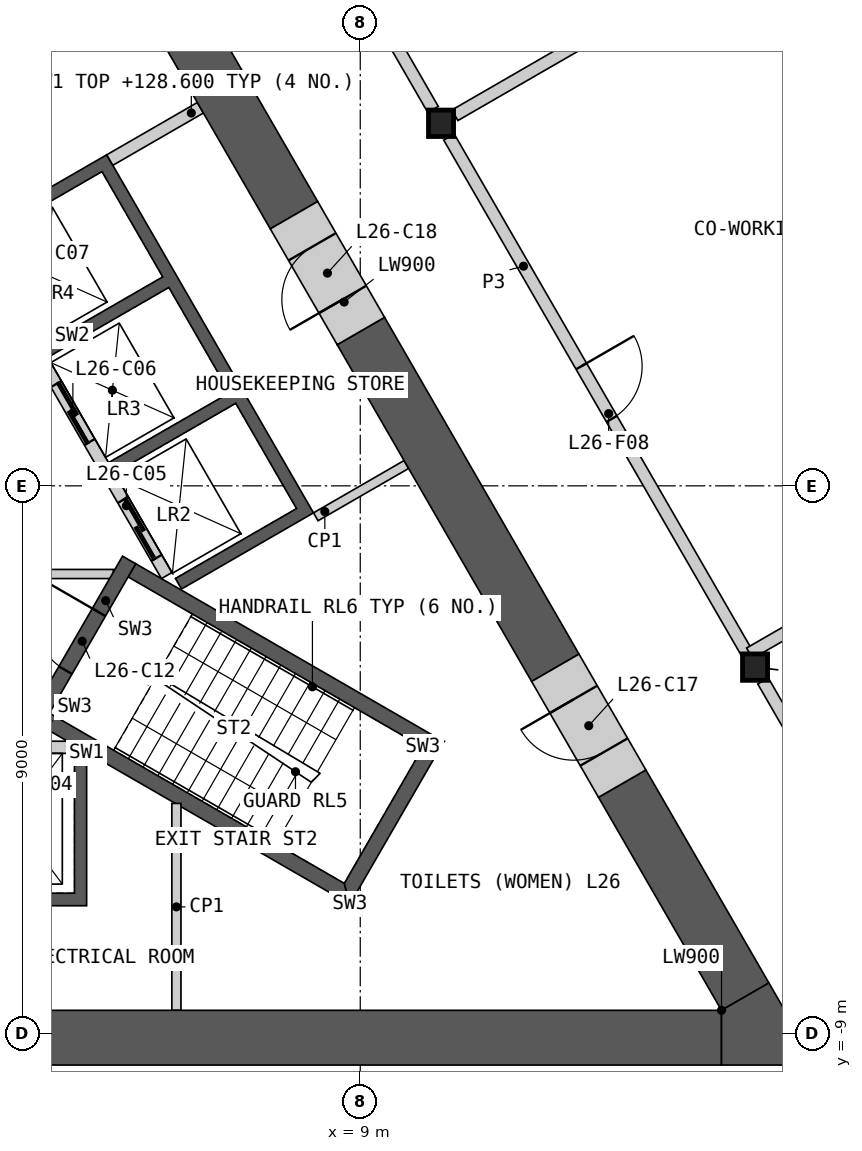
"""IFC4 building model, lengths in metres.
Left out: names, types, materials, properties, quantities, classifications, styles, units other than length and angle.
Written with IfcOpenShell. Run it as: python <this file> out.ifc"""

import sys

from ifc_helpers import new_model, si_unit, direction, frame, frame_2d, origin, origin_2d, place, context, subcontext, project, spatial, polyline, rectangle, i_section, outline, extrude, element, fill, save


model = new_model("IFC4")
c1 = context("Model", 3, precision=1e-05, world=origin(), true_north=direction((0.0, 1.0)))
c2 = subcontext(c1, "Body", "Model", "MODEL_VIEW")
j1 = project(units=[si_unit("LENGTHUNIT", "METRE"), si_unit("PLANEANGLEUNIT", "RADIAN")], contexts=[c1])
p1 = place(None, origin())
s1 = spatial("IfcSite", under=j1, at=p1, CompositionType="ELEMENT")
p2 = place(p1, origin())
s2 = spatial("IfcBuilding", under=s1, at=p2, CompositionType="ELEMENT")
p3 = place(p2, frame((0.0, 0.0, 124.8)))
s3 = spatial("IfcBuildingStorey", under=s2, at=p3, CompositionType="ELEMENT", Elevation=124.8)
for number, where, z_axis, x_axis in (
    (1, (15.493, -2.982, 0.0), (0.0, 0.0, 1.0), (1.0, 0.0, 0.0)),
    (2, (10.328, 5.963, 0.0), (0.0, 0.0, 1.0), (1.0, 0.0, 0.0)),
):
    element("IfcColumn", number, at=place(p3, frame(where, z_axis=z_axis, x_axis=x_axis)), inside=s3, PredefinedType="COLUMN", context=c2, shape_type="SweptSolid", body=[
        extrude(i_section(OverallWidth=0.412, OverallDepth=0.435, WebThickness=0.036, FlangeThickness=0.057, at=origin_2d()), origin(), (0.0, 0.0, 1.0), 4.2),
    ])
p4 = place(p3, origin())
e3 = element("IfcWall", 3, at=p4, inside=s3, PredefinedType="SHEAR", context=c2, shape_type="SweptSolid", body=[
    extrude(outline(polyline([(4.5, -4.4), (4.5, -6.906), (-4.5, -6.906), (-4.5, -4.4), (-4.3, -4.4), (-4.3, -6.7), (-2.3, -6.7), (-2.3, -4.4), (-2.1, -4.4), (-2.1, -6.7), (-0.1, -6.7), (-0.1, -4.4), (0.1, -4.4), (0.1, -6.7), (2.1, -6.7), (2.1, -4.4), (2.3, -4.4), (2.3, -6.7), (4.3, -6.7), (4.3, -4.4), (4.5, -4.4)])), origin(), (0.0, 0.0, 1.0), 3.8),
])
p5 = place(p3, frame((-4.187, -4.3, 0.0), z_axis=(0.0, 0.0, 1.0), x_axis=(1.0, 0.0, 0.0)))
e4 = element("IfcWall", 4, at=p5, inside=s3, PredefinedType="SOLIDWALL", context=c2, shape_type="SweptSolid", body=[
    extrude(rectangle(XDim=8.373, YDim=0.2, at=frame_2d((4.187, 0.0))), origin(), (0.0, 0.0, 1.0), 3.8),
])
p6 = place(p5, frame((0.287, 0.0, 0.0)))
e5 = element("IfcOpeningElement", 5, at=p6, cuts=e4, PredefinedType="OPENING", context=c2, shape_type="SweptSolid", body=[
    extrude(rectangle(XDim=1.2, YDim=2.1, at=frame_2d((0.6, 1.05))), frame((0.0, 0.11, 0.0), z_axis=(0.0, -1.0, 0.0), x_axis=(1.0, 0.0, 0.0)), (0.0, 0.0, 1.0), 0.22),
])
p7 = place(p5, frame((2.387, 0.0, 0.0)))
e6 = element("IfcOpeningElement", 6, at=p7, cuts=e4, PredefinedType="OPENING", context=c2, shape_type="SweptSolid", body=[
    extrude(rectangle(XDim=1.4, YDim=2.1, at=frame_2d((0.7, 1.05))), frame((0.0, 0.11, 0.0), z_axis=(0.0, -1.0, 0.0), x_axis=(1.0, 0.0, 0.0)), (0.0, 0.0, 1.0), 0.22),
])
p8 = place(p5, frame((4.737, 0.0, 0.0)))
e7 = element("IfcOpeningElement", 7, at=p8, cuts=e4, PredefinedType="OPENING", context=c2, shape_type="SweptSolid", body=[
    extrude(rectangle(XDim=1.1, YDim=2.1, at=frame_2d((0.55, 1.05))), frame((0.0, 0.11, 0.0), z_axis=(0.0, -1.0, 0.0), x_axis=(1.0, 0.0, 0.0)), (0.0, 0.0, 1.0), 0.22),
])
p9 = place(p5, frame((6.887, 0.0, 0.0)))
e8 = element("IfcOpeningElement", 8, at=p9, cuts=e4, PredefinedType="OPENING", context=c2, shape_type="SweptSolid", body=[
    extrude(rectangle(XDim=1.2, YDim=2.1, at=frame_2d((0.6, 1.05))), frame((0.0, 0.11, 0.0), z_axis=(0.0, -1.0, 0.0), x_axis=(1.0, 0.0, 0.0)), (0.0, 0.0, 1.0), 0.22),
])
p10 = place(p3, origin())
e9 = element("IfcWall", 9, at=p10, inside=s3, PredefinedType="SHEAR", context=c2, shape_type="SweptSolid", body=[
    extrude(outline(polyline([(2.66, 4.192), (4.831, 5.445), (8.231, -0.444), (6.061, -1.697), (5.96, -1.524), (7.952, -0.374), (6.952, 1.358), (4.96, 0.208), (4.861, 0.381), (6.852, 1.531), (5.852, 3.263), (3.861, 2.113), (3.76, 2.287), (5.752, 3.437), (4.752, 5.169), (2.76, 4.019), (2.66, 4.192)])), origin(), (0.0, 0.0, 1.0), 3.8),
])
p11 = place(p3, frame((5.817, -1.476, 0.0), z_axis=(0.0, 0.0, 1.0), x_axis=(-0.500002616675, 0.866023893041, 0.0)))
e10 = element("IfcWall", 10, at=p11, inside=s3, PredefinedType="SOLIDWALL", context=c2, shape_type="SweptSolid", body=[
    extrude(rectangle(XDim=8.373, YDim=0.2, at=frame_2d((4.187, 0.0))), origin(), (0.0, 0.0, 1.0), 3.8),
])
p12 = place(p11, frame((0.337, 0.0, 0.0)))
e11 = element("IfcOpeningElement", 11, at=p12, cuts=e10, PredefinedType="OPENING", context=c2, shape_type="SweptSolid", body=[
    extrude(rectangle(XDim=1.1, YDim=2.1, at=frame_2d((0.55, 1.05))), frame((0.0, 0.11, 0.0), z_axis=(0.0, -1.0, 0.0), x_axis=(1.0, 0.0, 0.0)), (0.0, 0.0, 1.0), 0.22),
])
p13 = place(p11, frame((2.537, 0.0, 0.0)))
e12 = element("IfcOpeningElement", 12, at=p13, cuts=e10, PredefinedType="OPENING", context=c2, shape_type="SweptSolid", body=[
    extrude(rectangle(XDim=1.1, YDim=2.1, at=frame_2d((0.55, 1.05))), frame((0.0, 0.11, 0.0), z_axis=(0.0, -1.0, 0.0), x_axis=(1.0, 0.0, 0.0)), (0.0, 0.0, 1.0), 0.22),
])
p14 = place(p11, frame((4.737, 0.0, 0.0)))
e13 = element("IfcOpeningElement", 13, at=p14, cuts=e10, PredefinedType="OPENING", context=c2, shape_type="SweptSolid", body=[
    extrude(rectangle(XDim=1.1, YDim=2.1, at=frame_2d((0.55, 1.05))), frame((0.0, 0.11, 0.0), z_axis=(0.0, -1.0, 0.0), x_axis=(1.0, 0.0, 0.0)), (0.0, 0.0, 1.0), 0.22),
])
p15 = place(p11, frame((7.037, 0.0, 0.0)))
e14 = element("IfcOpeningElement", 14, at=p15, cuts=e10, PredefinedType="OPENING", context=c2, shape_type="SweptSolid", body=[
    extrude(rectangle(XDim=0.9, YDim=2.1, at=frame_2d((0.45, 1.05))), frame((0.0, 0.11, 0.0), z_axis=(0.0, -1.0, 0.0), x_axis=(1.0, 0.0, 0.0)), (0.0, 0.0, 1.0), 0.22),
])
p16 = place(p3, frame((4.881, 5.358, 0.0), z_axis=(0.0, 0.0, 1.0), x_axis=(0.866024871741, 0.500000921525, 0.0)))
e15 = element("IfcWall", 15, at=p16, inside=s3, PredefinedType="SHEAR", context=c2, shape_type="SweptSolid", body=[
    extrude(rectangle(XDim=1.72, YDim=0.2, at=frame_2d((0.86, 0.0))), origin(), (0.0, 0.0, 1.0), 3.8),
])
p17 = place(p3, frame((-4.941, -1.45, 0.0), z_axis=(0.0, 0.0, 1.0), x_axis=(1.0, 0.0, 0.0)))
e16 = element("IfcWall", 16, at=p17, inside=s3, PredefinedType="PARTITIONING", context=c2, shape_type="SweptSolid", body=[
    extrude(rectangle(XDim=9.882, YDim=0.15, at=frame_2d((4.941, 0.0))), origin(), (0.0, 0.0, 1.0), 3.8),
])
p18 = place(p17, frame((4.391, 0.0, 0.0)))
e17 = element("IfcOpeningElement", 17, at=p18, cuts=e16, PredefinedType="OPENING", context=c2, shape_type="SweptSolid", body=[
    extrude(rectangle(XDim=1.1, YDim=2.1, at=frame_2d((0.55, 1.05))), frame((0.0, 0.085, 0.0), z_axis=(0.0, -1.0, 0.0), x_axis=(1.0, 0.0, 0.0)), (0.0, 0.0, 1.0), 0.17),
])
p19 = place(p3, origin())
e18 = element("IfcWall", 18, at=p19, inside=s3, PredefinedType="SHEAR", context=c2, shape_type="SweptSolid", body=[
    extrude(outline(polyline([(3.763, -3.956), (8.83, -6.881), (8.738, -6.539), (3.888, -3.739), (3.763, -3.956)])), origin(), (0.0, 0.0, 1.0), 3.8),
])
p20 = place(p3, origin())
e19 = element("IfcWall", 19, at=p20, inside=s3, PredefinedType="SHEAR", context=c2, shape_type="SweptSolid", body=[
    extrude(outline(polyline([(8.83, -6.881), (10.374, -4.206), (10.032, -4.298), (8.738, -6.539), (8.83, -6.881)])), origin(), (0.0, 0.0, 1.0), 3.8),
])
p21 = place(p3, origin())
e20 = element("IfcWall", 20, at=p21, inside=s3, PredefinedType="SHEAR", context=c2, shape_type="SweptSolid", body=[
    extrude(outline(polyline([(10.032, -4.298), (10.374, -4.206), (5.307, -1.281), (5.182, -1.498), (10.032, -4.298)])), origin(), (0.0, 0.0, 1.0), 3.8),
])
p22 = place(p3, frame((3.655, -3.893, 0.0), z_axis=(0.0, 0.0, 1.0), x_axis=(0.499982516597, 0.866035497597, 0.0)))
e21 = element("IfcWall", 21, at=p22, inside=s3, PredefinedType="SHEAR", context=c2, shape_type="SweptSolid", body=[
    extrude(rectangle(XDim=3.088, YDim=0.25, at=frame_2d((1.544, 0.0))), origin(), (0.0, 0.0, 1.0), 3.8),
])
p23 = place(p22, frame((0.994, 0.0, 0.0)))
e22 = element("IfcOpeningElement", 22, at=p23, cuts=e21, PredefinedType="OPENING", context=c2, shape_type="SweptSolid", body=[
    extrude(rectangle(XDim=1.1, YDim=2.1, at=frame_2d((0.55, 1.05))), frame((0.0, 0.135, 0.0), z_axis=(0.0, -1.0, 0.0), x_axis=(1.0, 0.0, 0.0)), (0.0, 0.0, 1.0), 0.27),
])
p24 = place(p3, frame((8.268, -0.509, 0.0), z_axis=(0.0, 0.0, 1.0), x_axis=(0.866024871741, 0.500000921525, 0.0)))
e23 = element("IfcWall", 23, at=p24, inside=s3, PredefinedType="PARTITIONING", context=c2, shape_type="SweptSolid", body=[
    extrude(rectangle(XDim=1.72, YDim=0.15, at=frame_2d((0.86, 0.0))), origin(), (0.0, 0.0, 1.0), 3.8),
])
p25 = place(p3, frame((5.977, -8.626, 0.0), z_axis=(0.0, 0.0, 1.0), x_axis=(0.0, 1.0, 0.0)))
e24 = element("IfcWall", 24, at=p25, inside=s3, PredefinedType="PARTITIONING", context=c2, shape_type="SweptSolid", body=[
    extrude(rectangle(XDim=3.403, YDim=0.15, at=frame_2d((1.701, 0.0))), origin(), (0.0, 0.0, 1.0), 3.8),
])
p26 = place(p3, frame((3.913, -9.076, 0.0), z_axis=(0.0, 0.0, 1.0), x_axis=(1.0, 0.0, 0.0)))
e25 = element("IfcWall", 25, at=p26, inside=s3, PredefinedType="SHEAR", context=c2, shape_type="SweptSolid", body=[
    extrude(rectangle(XDim=11.029, YDim=0.9, at=frame_2d((5.514, 0.0))), origin(), (0.0, 0.0, 1.0), 3.8),
])
p27 = place(p3, frame((7.91, 4.451, 0.0), z_axis=(0.0, 0.0, 1.0), x_axis=(-0.500001962043, 0.866024270995, 0.0)))
e26 = element("IfcWall", 26, at=p27, inside=s3, PredefinedType="SHEAR", context=c2, shape_type="SweptSolid", body=[
    extrude(rectangle(XDim=8.796, YDim=0.9, at=frame_2d((4.398, 0.0))), origin(), (0.0, 0.0, 1.0), 3.8),
])
p28 = place(p3, frame((12.208, -2.992, 0.0), z_axis=(0.0, 0.0, 1.0), x_axis=(-0.499990106751, 0.866031115579, 0.0)))
e27 = element("IfcWall", 27, at=p28, inside=s3, PredefinedType="SHEAR", context=c2, shape_type="SweptSolid", body=[
    extrude(rectangle(XDim=6.396, YDim=0.9, at=frame_2d((3.198, 0.0))), origin(), (0.0, 0.0, 1.0), 3.8),
])
p29 = place(p3, frame((15.331, -8.401, 0.0), z_axis=(0.0, 0.0, 1.0), x_axis=(-0.499974938593, 0.866039872511, 0.0)))
e28 = element("IfcWall", 28, at=p29, inside=s3, PredefinedType="SHEAR", context=c2, shape_type="SweptSolid", body=[
    extrude(rectangle(XDim=4.046, YDim=0.9, at=frame_2d((2.023, 0.0))), origin(), (0.0, 0.0, 1.0), 3.8),
])
p30 = place(p3, origin())
e29 = element("IfcWall", 29, at=p30, inside=s3, PredefinedType="SHEAR", context=c2, shape_type="SweptSolid", body=[
    extrude(outline(polyline([(14.941, -8.626), (15.721, -8.176), (16.5, -9.526), (14.941, -9.526), (14.941, -8.626)])), origin(), (0.0, 0.0, 1.0), 3.8),
])
p31 = place(p3, frame((13.308, -4.898, 0.0), z_axis=(0.0, 0.0, 1.0), x_axis=(-0.50002983664, 0.866008176907, 0.0)))
e30 = element("IfcWall", 30, at=p31, inside=s3, PredefinedType="SHEAR", context=c2, shape_type="SweptSolid", body=[
    extrude(rectangle(XDim=2.2, YDim=0.9, at=frame_2d((1.1, 0.0))), origin(), (0.0, 0.0, 1.0), 3.8),
])
p32 = place(p31, frame((0.6, 0.0, 0.0)))
e31 = element("IfcOpeningElement", 31, at=p32, cuts=e30, PredefinedType="OPENING", context=c2, shape_type="SweptSolid", body=[
    extrude(rectangle(XDim=1.0, YDim=2.1, at=frame_2d((0.5, 1.05))), frame((0.0, 0.46, 0.0), z_axis=(0.0, -1.0, 0.0), x_axis=(1.0, 0.0, 0.0)), (0.0, 0.0, 1.0), 0.92),
])
p33 = place(p3, frame((9.01, 2.546, 0.0), z_axis=(0.0, 0.0, 1.0), x_axis=(-0.499994660107, 0.866028486751, 0.0)))
e32 = element("IfcWall", 32, at=p33, inside=s3, PredefinedType="SHEAR", context=c2, shape_type="SweptSolid", body=[
    extrude(rectangle(XDim=2.2, YDim=0.9, at=frame_2d((1.1, 0.0))), origin(), (0.0, 0.0, 1.0), 3.8),
])
p34 = place(p33, frame((0.6, 0.0, 0.0)))
e33 = element("IfcOpeningElement", 33, at=p34, cuts=e32, PredefinedType="OPENING", context=c2, shape_type="SweptSolid", body=[
    extrude(rectangle(XDim=1.0, YDim=2.1, at=frame_2d((0.5, 1.05))), frame((0.0, 0.46, 0.0), z_axis=(0.0, -1.0, 0.0), x_axis=(1.0, 0.0, 0.0)), (0.0, 0.0, 1.0), 0.92),
])
p35 = place(p3, frame((10.46, 5.736, 0.0), z_axis=(0.0, 0.0, 1.0), x_axis=(0.500004141693, -0.866023012564, 0.0)))
e34 = element("IfcWall", 34, at=p35, inside=s3, PredefinedType="PARTITIONING", context=c2, shape_type="SweptSolid", body=[
    extrude(rectangle(XDim=9.803, YDim=0.2, at=frame_2d((4.902, 0.0))), origin(), (0.0, 0.0, 1.0), 3.8),
])
p36 = place(p35, frame((4.352, 0.0, 0.0)))
e35 = element("IfcOpeningElement", 35, at=p36, cuts=e34, PredefinedType="OPENING", context=c2, shape_type="SweptSolid", body=[
    extrude(rectangle(XDim=1.0, YDim=2.1, at=frame_2d((0.5, 1.05))), frame((0.0, 0.11, 0.0), z_axis=(0.0, -1.0, 0.0), x_axis=(1.0, 0.0, 0.0)), (0.0, 0.0, 1.0), 0.22),
])
p37 = place(p3, frame((5.295, 14.68, 0.0), z_axis=(0.0, 0.0, 1.0), x_axis=(0.500012035596, -0.866018454918, 0.0)))
e36 = element("IfcWall", 36, at=p37, inside=s3, PredefinedType="PARTITIONING", context=c2, shape_type="SweptSolid", body=[
    extrude(rectangle(XDim=9.803, YDim=0.2, at=frame_2d((4.902, 0.0))), origin(), (0.0, 0.0, 1.0), 3.8),
])
p38 = place(p37, frame((4.052, 0.0, 0.0)))
e37 = element("IfcOpeningElement", 37, at=p38, cuts=e36, PredefinedType="OPENING", context=c2, shape_type="SweptSolid", body=[
    extrude(rectangle(XDim=1.8, YDim=2.1, at=frame_2d((0.9, 1.05))), frame((0.0, 0.11, 0.0), z_axis=(0.0, -1.0, 0.0), x_axis=(1.0, 0.0, 0.0)), (0.0, 0.0, 1.0), 0.22),
])
p39 = place(p3, frame((15.624, -3.209, 0.0), z_axis=(0.0, 0.0, 1.0), x_axis=(0.499997920671, -0.866026604282, 0.0)))
e38 = element("IfcWall", 38, at=p39, inside=s3, PredefinedType="PARTITIONING", context=c2, shape_type="SweptSolid", body=[
    extrude(rectangle(XDim=6.24, YDim=0.2, at=frame_2d((3.12, 0.0))), origin(), (0.0, 0.0, 1.0), 3.8),
])
p40 = place(p39, frame((2.57, 0.0, 0.0)))
e39 = element("IfcOpeningElement", 39, at=p40, cuts=e38, PredefinedType="OPENING", context=c2, shape_type="SweptSolid", body=[
    extrude(rectangle(XDim=1.0, YDim=2.1, at=frame_2d((0.5, 1.05))), frame((0.0, 0.11, 0.0), z_axis=(0.0, -1.0, 0.0), x_axis=(1.0, 0.0, 0.0)), (0.0, 0.0, 1.0), 0.22),
])
p41 = place(p3, frame((15.403, -2.754, 0.0), z_axis=(0.0, 0.0, 1.0), x_axis=(0.866024473704, 0.500001610943, 0.0)))
e40 = element("IfcWall", 40, at=p41, inside=s3, PredefinedType="PARTITIONING", context=c2, shape_type="SweptSolid", body=[
    extrude(rectangle(XDim=12.971, YDim=0.2, at=frame_2d((6.485, 0.0))), origin(), (0.0, 0.0, 1.0), 2.885),
])
p42 = place(p3, frame((10.556, 6.094, 0.0), z_axis=(0.0, 0.0, 1.0), x_axis=(0.86602461759, 0.500001361726, 0.0)))
e41 = element("IfcWall", 41, at=p42, inside=s3, PredefinedType="PARTITIONING", context=c2, shape_type="SweptSolid", body=[
    extrude(rectangle(XDim=12.679, YDim=0.2, at=frame_2d((6.34, 0.0))), origin(), (0.0, 0.0, 1.0), 2.885),
])
p43 = place(p12, origin())
e42 = element("IfcDoor", 42, at=p43, inside=s3, OperationType="SLIDING_TO_LEFT", PredefinedType="DOOR", context=c2, shape_type="SweptSolid", body=[
    extrude(rectangle(XDim=1.1, YDim=2.1, at=frame_2d((0.55, 1.05))), frame((0.0, 0.025, 0.0), z_axis=(0.0, -1.0, 0.0), x_axis=(1.0, 0.0, 0.0)), (0.0, 0.0, 1.0), 0.05),
])
fill(e11, e42)
p44 = place(p13, origin())
e43 = element("IfcDoor", 43, at=p44, inside=s3, OperationType="SLIDING_TO_LEFT", PredefinedType="DOOR", context=c2, shape_type="SweptSolid", body=[
    extrude(rectangle(XDim=1.1, YDim=2.1, at=frame_2d((0.55, 1.05))), frame((0.0, 0.025, 0.0), z_axis=(0.0, -1.0, 0.0), x_axis=(1.0, 0.0, 0.0)), (0.0, 0.0, 1.0), 0.05),
])
fill(e12, e43)
p45 = place(p23, origin())
e44 = element("IfcDoor", 44, at=p45, inside=s3, OperationType="SINGLE_SWING_RIGHT", PredefinedType="DOOR", context=c2, shape_type="SweptSolid", body=[
    extrude(rectangle(XDim=1.1, YDim=2.1, at=frame_2d((0.55, 1.05))), frame((0.0, 0.025, 0.0), z_axis=(0.0, -1.0, 0.0), x_axis=(1.0, 0.0, 0.0)), (0.0, 0.0, 1.0), 0.05),
])
fill(e22, e44)
p46 = place(p32, origin())
e45 = element("IfcDoor", 45, at=p46, inside=s3, OperationType="SINGLE_SWING_RIGHT", PredefinedType="DOOR", context=c2, shape_type="SweptSolid", body=[
    extrude(rectangle(XDim=1.0, YDim=2.1, at=frame_2d((0.5, 1.05))), frame((0.0, 0.205, 0.0), z_axis=(0.0, -1.0, 0.0), x_axis=(1.0, 0.0, 0.0)), (0.0, 0.0, 1.0), 0.05),
])
fill(e31, e45)
p47 = place(p34, origin())
e46 = element("IfcDoor", 46, at=p47, inside=s3, OperationType="SINGLE_SWING_LEFT", PredefinedType="DOOR", context=c2, shape_type="SweptSolid", body=[
    extrude(rectangle(XDim=1.0, YDim=2.1, at=frame_2d((0.5, 1.05))), frame((0.0, 0.205, 0.0), z_axis=(0.0, -1.0, 0.0), x_axis=(1.0, 0.0, 0.0)), (0.0, 0.0, 1.0), 0.05),
])
fill(e33, e46)
p48 = place(p36, origin())
e47 = element("IfcDoor", 47, at=p48, inside=s3, OperationType="SINGLE_SWING_LEFT", PredefinedType="DOOR", context=c2, shape_type="SweptSolid", body=[
    extrude(rectangle(XDim=1.0, YDim=2.1, at=frame_2d((0.5, 1.05))), frame((0.0, 0.025, 0.0), z_axis=(0.0, -1.0, 0.0), x_axis=(1.0, 0.0, 0.0)), (0.0, 0.0, 1.0), 0.05),
])
fill(e35, e47)
save(model, sys.argv[1])
